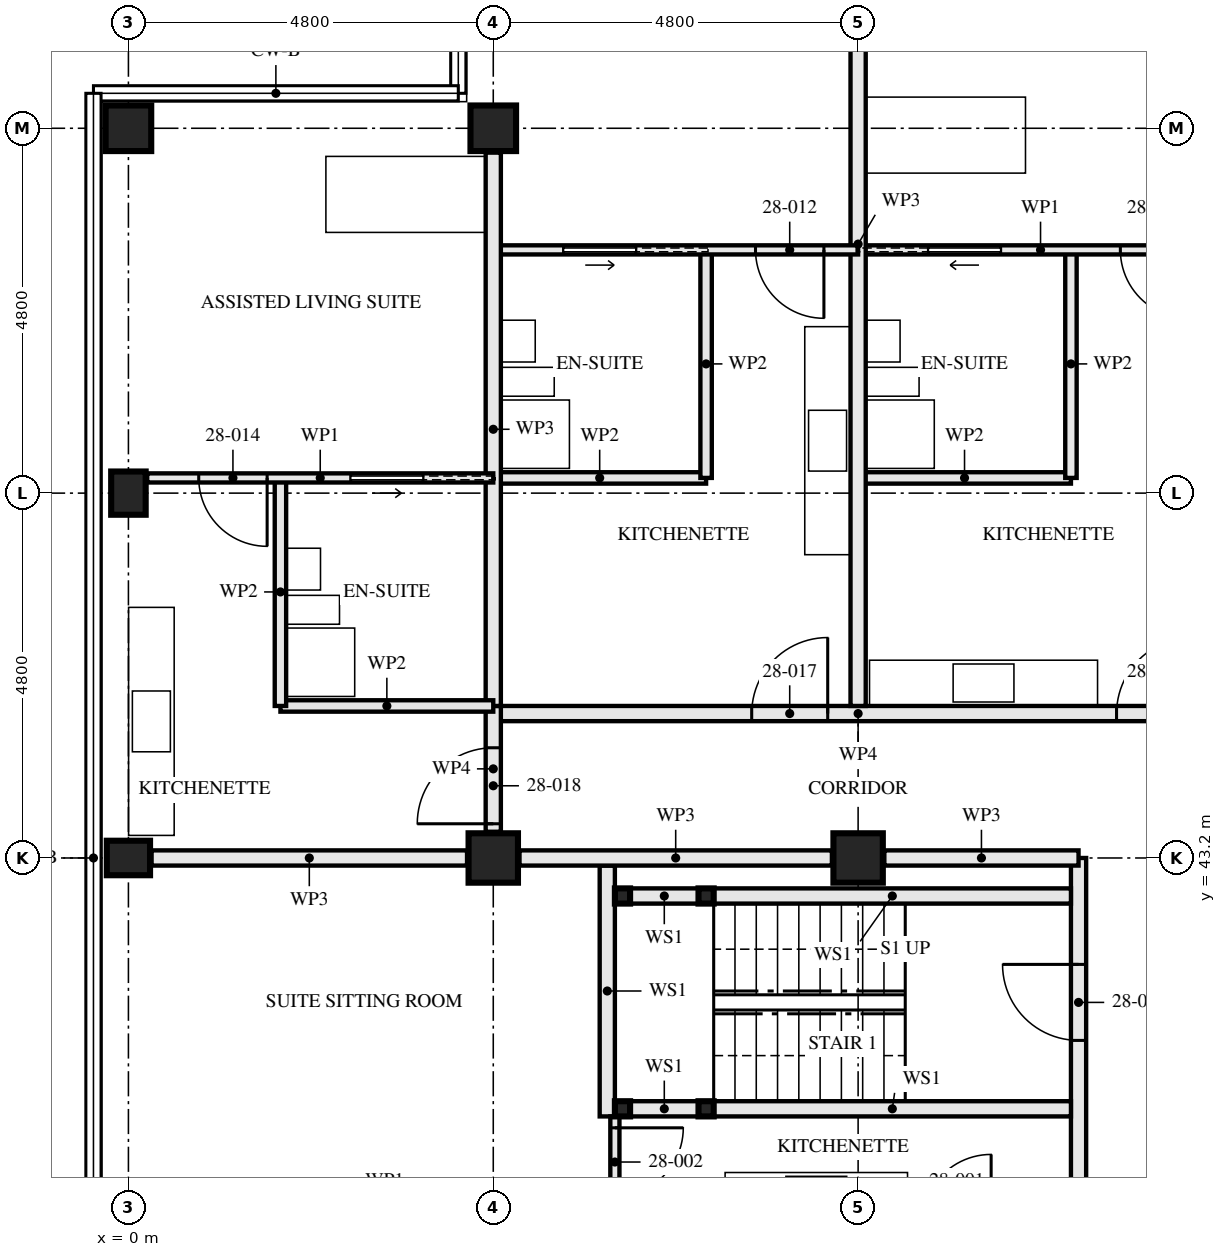
"""IFC4 building model, lengths in metres.
Left out: names, types, materials, properties, quantities, classifications, styles, units other than length and angle.
Written with IfcOpenShell. Run it as: python <this file> out.ifc"""

import sys

from ifc_helpers import new_model, si_unit, direction, frame, frame_2d, origin, origin_2d, place, context, subcontext, project, spatial, rectangle, hollow_rectangle, i_section, extrude, element, fill, save


model = new_model("IFC4")
c1 = context("Model", 3, precision=1e-05, world=origin(), true_north=direction((0.0, 1.0)))
c2 = subcontext(c1, "Body", "Model", "MODEL_VIEW")
j1 = project(units=[si_unit("LENGTHUNIT", "METRE"), si_unit("PLANEANGLEUNIT", "RADIAN")], contexts=[c1])
p1 = place(None, origin())
s1 = spatial("IfcSite", under=j1, at=p1, CompositionType="ELEMENT")
p2 = place(p1, origin())
s2 = spatial("IfcBuilding", under=s1, at=p2, CompositionType="ELEMENT")
p3 = place(p2, frame((0.0, 0.0, 105.0)))
s3 = spatial("IfcBuildingStorey", under=s2, at=p3, CompositionType="ELEMENT", Elevation=105.0)
for number, where, z_axis, x_axis in (
    (1, (0.0, 43.2, 0.0), (0.0, 0.0, 1.0), (0.0, 1.0, 0.0)),
    (2, (0.0, 48.0, 0.0), (0.0, 0.0, 1.0), (1.0, 0.0, 0.0)),
):
    element("IfcColumn", number, at=place(p3, frame(where, z_axis=z_axis, x_axis=x_axis)), inside=s3, PredefinedType="COLUMN", context=c2, shape_type="SweptSolid", body=[
        extrude(i_section(OverallWidth=0.454, OverallDepth=0.569, WebThickness=0.078, FlangeThickness=0.125, FilletRadius=0.015, at=origin_2d()), origin(), (0.0, 0.0, 1.0), 3.5),
    ])
p4 = place(p3, frame((0.0, 52.8, 0.0), z_axis=(0.0, 0.0, 1.0), x_axis=(0.0, 1.0, 0.0)))
e3 = element("IfcColumn", 3, at=p4, inside=s3, PredefinedType="COLUMN", context=c2, shape_type="SweptSolid", body=[
    extrude(hollow_rectangle(XDim=0.6, YDim=0.6, WallThickness=0.05, at=origin_2d()), origin(), (0.0, 0.0, 1.0), 3.5),
])
p5 = place(p3, frame((4.8, 43.2, 0.0), z_axis=(0.0, 0.0, 1.0), x_axis=(0.0, 1.0, 0.0)))
e4 = element("IfcColumn", 4, at=p5, inside=s3, PredefinedType="COLUMN", context=c2, shape_type="SweptSolid", body=[
    extrude(hollow_rectangle(XDim=0.65, YDim=0.65, WallThickness=0.05, at=origin_2d()), origin(), (0.0, 0.0, 1.0), 3.5),
])
p6 = place(p3, frame((4.8, 52.8, 0.0), z_axis=(0.0, 0.0, 1.0), x_axis=(0.0, 1.0, 0.0)))
e5 = element("IfcColumn", 5, at=p6, inside=s3, PredefinedType="COLUMN", context=c2, shape_type="SweptSolid", body=[
    extrude(hollow_rectangle(XDim=0.6, YDim=0.6, WallThickness=0.05, at=origin_2d()), origin(), (0.0, 0.0, 1.0), 3.5),
])
p7 = place(p3, frame((9.6, 43.2, 0.0), z_axis=(0.0, 0.0, 1.0), x_axis=(0.0, 1.0, 0.0)))
e6 = element("IfcColumn", 6, at=p7, inside=s3, PredefinedType="COLUMN", context=c2, shape_type="SweptSolid", body=[
    extrude(hollow_rectangle(XDim=0.65, YDim=0.65, WallThickness=0.05, at=origin_2d()), origin(), (0.0, 0.0, 1.0), 3.5),
])
for number, where, z_axis, x_axis in (
    (7, (6.5, 42.7, 0.0), (0.0, 0.0, 1.0), (1.0, 0.0, 0.0)),
    (8, (6.5, 39.9, 0.0), (0.0, 0.0, 1.0), (1.0, 0.0, 0.0)),
    (9, (7.6, 42.7, 0.0), (0.0, 0.0, 1.0), (1.0, 0.0, 0.0)),
    (10, (7.6, 39.9, 0.0), (0.0, 0.0, 1.0), (1.0, 0.0, 0.0)),
):
    element("IfcColumn", number, at=place(p3, frame(where, z_axis=z_axis, x_axis=x_axis)), inside=s3, PredefinedType="COLUMN", context=c2, shape_type="SweptSolid", body=[
        extrude(hollow_rectangle(XDim=0.2, YDim=0.2, WallThickness=0.008, at=origin_2d()), origin(), (0.0, 0.0, 1.0), 3.33),
    ])
p8 = place(p3, frame((6.6, 42.7, 0.0), z_axis=(0.0, 0.0, 1.0), x_axis=(1.0, 0.0, 0.0)))
e11 = element("IfcWall", 11, at=p8, inside=s3, PredefinedType="SOLIDWALL", context=c2, shape_type="SweptSolid", body=[
    extrude(rectangle(XDim=0.9, YDim=0.2, at=frame_2d((0.45, 0.0))), origin(), (0.0, 0.0, 1.0), 2.99),
])
p9 = place(p3, frame((7.7, 42.7, 0.0), z_axis=(0.0, 0.0, 1.0), x_axis=(1.0, 0.0, 0.0)))
e12 = element("IfcWall", 12, at=p9, inside=s3, PredefinedType="SOLIDWALL", context=c2, shape_type="SweptSolid", body=[
    extrude(rectangle(XDim=4.7, YDim=0.2, at=frame_2d((2.35, 0.0))), origin(), (0.0, 0.0, 1.0), 2.99),
])
p10 = place(p3, frame((6.6, 39.9, 0.0), z_axis=(0.0, 0.0, 1.0), x_axis=(1.0, 0.0, 0.0)))
e13 = element("IfcWall", 13, at=p10, inside=s3, PredefinedType="SOLIDWALL", context=c2, shape_type="SweptSolid", body=[
    extrude(rectangle(XDim=0.9, YDim=0.2, at=frame_2d((0.45, 0.0))), origin(), (0.0, 0.0, 1.0), 2.99),
])
p11 = place(p3, frame((7.7, 39.9, 0.0), z_axis=(0.0, 0.0, 1.0), x_axis=(1.0, 0.0, 0.0)))
e14 = element("IfcWall", 14, at=p11, inside=s3, PredefinedType="SOLIDWALL", context=c2, shape_type="SweptSolid", body=[
    extrude(rectangle(XDim=4.7, YDim=0.2, at=frame_2d((2.35, 0.0))), origin(), (0.0, 0.0, 1.0), 2.99),
])
p12 = place(p3, frame((6.3, 43.1, 0.0), z_axis=(0.0, 0.0, 1.0), x_axis=(0.0, -1.0, 0.0)))
e15 = element("IfcWall", 15, at=p12, inside=s3, PredefinedType="SOLIDWALL", context=c2, shape_type="SweptSolid", body=[
    extrude(rectangle(XDim=3.3, YDim=0.2, at=frame_2d((1.65, 0.0))), origin(), (0.0, 0.0, 1.0), 3.33),
])
p13 = place(p3, frame((6.4, 39.8, 0.0), z_axis=(0.0, 0.0, 1.0), x_axis=(0.0, -1.0, 0.0)))
e16 = element("IfcWall", 16, at=p13, inside=s3, PredefinedType="PARTITIONING", context=c2, shape_type="SweptSolid", body=[
    extrude(rectangle(XDim=1.4, YDim=0.12, at=frame_2d((0.7, 0.0))), origin(), (0.0, 0.0, 1.0), 3.33),
])
p14 = place(p13, frame((0.15, 0.0, 0.0)))
e17 = element("IfcOpeningElement", 17, at=p14, cuts=e16, PredefinedType="OPENING", context=c2, shape_type="SweptSolid", body=[
    extrude(rectangle(XDim=0.9, YDim=2.1, at=frame_2d((0.45, 1.05))), frame((0.0, 0.071, 0.0), z_axis=(0.0, -1.0, 0.0), x_axis=(1.0, 0.0, 0.0)), (0.0, 0.0, 1.0), 0.141),
])
p15 = place(p3, frame((12.5, 43.2, 0.0), z_axis=(0.0, 0.0, 1.0), x_axis=(0.0, -1.0, 0.0)))
e18 = element("IfcWall", 18, at=p15, inside=s3, PredefinedType="PARTITIONING", context=c2, shape_type="SweptSolid", body=[
    extrude(rectangle(XDim=14.84, YDim=0.2, at=frame_2d((7.42, 0.0))), origin(), (0.0, 0.0, 1.0), 2.32),
])
p16 = place(p15, frame((1.4, 0.0, 0.0)))
e19 = element("IfcOpeningElement", 19, at=p16, cuts=e18, PredefinedType="OPENING", context=c2, shape_type="SweptSolid", body=[
    extrude(rectangle(XDim=1.0, YDim=2.1, at=frame_2d((0.5, 1.05))), frame((0.0, 0.111, 0.0), z_axis=(0.0, -1.0, 0.0), x_axis=(1.0, 0.0, 0.0)), (0.0, 0.0, 1.0), 0.221),
])
p17 = place(p15, frame((5.2, 0.0, 0.0)))
e20 = element("IfcOpeningElement", 20, at=p17, cuts=e18, PredefinedType="OPENING", context=c2, shape_type="SweptSolid", body=[
    extrude(rectangle(XDim=1.0, YDim=2.1, at=frame_2d((0.5, 1.05))), frame((0.0, 0.111, 0.0), z_axis=(0.0, -1.0, 0.0), x_axis=(1.0, 0.0, 0.0)), (0.0, 0.0, 1.0), 0.221),
])
p18 = place(p15, frame((13.0, 0.0, 0.0)))
e21 = element("IfcOpeningElement", 21, at=p18, cuts=e18, PredefinedType="OPENING", context=c2, shape_type="SweptSolid", body=[
    extrude(rectangle(XDim=1.0, YDim=2.1, at=frame_2d((0.5, 1.05))), frame((0.0, 0.111, 0.0), z_axis=(0.0, -1.0, 0.0), x_axis=(1.0, 0.0, 0.0)), (0.0, 0.0, 1.0), 0.221),
])
p19 = place(p3, frame((12.4, 51.2, 0.0), z_axis=(0.0, 0.0, 1.0), x_axis=(0.0, -1.0, 0.0)))
e22 = element("IfcWall", 22, at=p19, inside=s3, PredefinedType="PARTITIONING", context=c2, shape_type="SweptSolid", body=[
    extrude(rectangle(XDim=3.0, YDim=0.15, at=frame_2d((1.5, 0.0))), origin(), (0.0, 0.0, 1.0), 3.33),
])
p20 = place(p3, frame((12.4, 48.2, 0.0), z_axis=(0.0, 0.0, 1.0), x_axis=(-1.0, 0.0, 0.0)))
e23 = element("IfcWall", 23, at=p20, inside=s3, PredefinedType="PARTITIONING", context=c2, shape_type="SweptSolid", body=[
    extrude(rectangle(XDim=2.8, YDim=0.15, at=frame_2d((1.4, 0.0))), origin(), (0.0, 0.0, 1.0), 3.33),
])
p21 = place(p3, frame((14.4, 51.2, 0.0), z_axis=(0.0, 0.0, 1.0), x_axis=(-1.0, 0.0, 0.0)))
e24 = element("IfcWall", 24, at=p21, inside=s3, PredefinedType="PARTITIONING", context=c2, shape_type="SweptSolid", body=[
    extrude(rectangle(XDim=4.8, YDim=0.12, at=frame_2d((2.4, 0.0))), origin(), (0.0, 0.0, 1.0), 3.33),
])
p22 = place(p21, frame((0.45, 0.0, 0.0)))
e25 = element("IfcOpeningElement", 25, at=p22, cuts=e24, PredefinedType="OPENING", context=c2, shape_type="SweptSolid", body=[
    extrude(rectangle(XDim=0.9, YDim=2.1, at=frame_2d((0.45, 1.05))), frame((0.0, 0.071, 0.0), z_axis=(0.0, -1.0, 0.0), x_axis=(1.0, 0.0, 0.0)), (0.0, 0.0, 1.0), 0.141),
])
p23 = place(p21, frame((2.925, 0.0, 0.0)))
e26 = element("IfcOpeningElement", 26, at=p23, cuts=e24, PredefinedType="OPENING", context=c2, shape_type="SweptSolid", body=[
    extrude(rectangle(XDim=0.95, YDim=2.1, at=frame_2d((0.475, 1.05))), frame((0.0, 0.071, 0.0), z_axis=(0.0, -1.0, 0.0), x_axis=(1.0, 0.0, 0.0)), (0.0, 0.0, 1.0), 0.141),
])
p24 = place(p3, frame((9.6, 57.353, 0.0), z_axis=(0.0, 0.0, 1.0), x_axis=(0.0, -1.0, 0.0)))
e27 = element("IfcWall", 27, at=p24, inside=s3, PredefinedType="PARTITIONING", context=c2, shape_type="SweptSolid", body=[
    extrude(rectangle(XDim=12.153, YDim=0.2, at=frame_2d((6.077, 0.0))), origin(), (0.0, 0.0, 1.0), 2.55),
])
p25 = place(p3, frame((7.6, 51.2, 0.0), z_axis=(0.0, 0.0, 1.0), x_axis=(0.0, -1.0, 0.0)))
e28 = element("IfcWall", 28, at=p25, inside=s3, PredefinedType="PARTITIONING", context=c2, shape_type="SweptSolid", body=[
    extrude(rectangle(XDim=3.0, YDim=0.15, at=frame_2d((1.5, 0.0))), origin(), (0.0, 0.0, 1.0), 3.33),
])
p26 = place(p3, frame((7.6, 48.2, 0.0), z_axis=(0.0, 0.0, 1.0), x_axis=(-1.0, 0.0, 0.0)))
e29 = element("IfcWall", 29, at=p26, inside=s3, PredefinedType="PARTITIONING", context=c2, shape_type="SweptSolid", body=[
    extrude(rectangle(XDim=2.8, YDim=0.15, at=frame_2d((1.4, 0.0))), origin(), (0.0, 0.0, 1.0), 3.33),
])
p27 = place(p3, frame((9.6, 51.2, 0.0), z_axis=(0.0, 0.0, 1.0), x_axis=(-1.0, 0.0, 0.0)))
e30 = element("IfcWall", 30, at=p27, inside=s3, PredefinedType="PARTITIONING", context=c2, shape_type="SweptSolid", body=[
    extrude(rectangle(XDim=4.8, YDim=0.12, at=frame_2d((2.4, 0.0))), origin(), (0.0, 0.0, 1.0), 3.33),
])
p28 = place(p27, frame((0.45, 0.0, 0.0)))
e31 = element("IfcOpeningElement", 31, at=p28, cuts=e30, PredefinedType="OPENING", context=c2, shape_type="SweptSolid", body=[
    extrude(rectangle(XDim=0.9, YDim=2.1, at=frame_2d((0.45, 1.05))), frame((0.0, 0.071, 0.0), z_axis=(0.0, -1.0, 0.0), x_axis=(1.0, 0.0, 0.0)), (0.0, 0.0, 1.0), 0.141),
])
p29 = place(p27, frame((2.925, 0.0, 0.0)))
e32 = element("IfcOpeningElement", 32, at=p29, cuts=e30, PredefinedType="OPENING", context=c2, shape_type="SweptSolid", body=[
    extrude(rectangle(XDim=0.95, YDim=2.1, at=frame_2d((0.475, 1.05))), frame((0.0, 0.071, 0.0), z_axis=(0.0, -1.0, 0.0), x_axis=(1.0, 0.0, 0.0)), (0.0, 0.0, 1.0), 0.141),
])
p30 = place(p3, frame((4.8, 52.48, 0.0), z_axis=(0.0, 0.0, 1.0), x_axis=(0.0, -1.0, 0.0)))
e33 = element("IfcWall", 33, at=p30, inside=s3, PredefinedType="PARTITIONING", context=c2, shape_type="SweptSolid", body=[
    extrude(rectangle(XDim=7.28, YDim=0.2, at=frame_2d((3.64, 0.0))), origin(), (0.0, 0.0, 1.0), 2.55),
])
p31 = place(p3, frame((2.0, 48.2, 0.0), z_axis=(0.0, 0.0, 1.0), x_axis=(0.0, -1.0, 0.0)))
e34 = element("IfcWall", 34, at=p31, inside=s3, PredefinedType="PARTITIONING", context=c2, shape_type="SweptSolid", body=[
    extrude(rectangle(XDim=3.0, YDim=0.15, at=frame_2d((1.5, 0.0))), origin(), (0.0, 0.0, 1.0), 2.55),
])
p32 = place(p3, frame((4.8, 45.2, 0.0), z_axis=(0.0, 0.0, 1.0), x_axis=(-1.0, 0.0, 0.0)))
e35 = element("IfcWall", 35, at=p32, inside=s3, PredefinedType="PARTITIONING", context=c2, shape_type="SweptSolid", body=[
    extrude(rectangle(XDim=2.8, YDim=0.15, at=frame_2d((1.4, 0.0))), origin(), (0.0, 0.0, 1.0), 3.33),
])
p33 = place(p3, frame((4.8, 48.2, 0.0), z_axis=(0.0, 0.0, 1.0), x_axis=(-1.0, 0.0, 0.0)))
e36 = element("IfcWall", 36, at=p33, inside=s3, PredefinedType="PARTITIONING", context=c2, shape_type="SweptSolid", body=[
    extrude(rectangle(XDim=4.553, YDim=0.12, at=frame_2d((2.276, 0.0))), origin(), (0.0, 0.0, 1.0), 3.33),
])
p34 = place(p33, frame((2.975, 0.0, 0.0)))
e37 = element("IfcOpeningElement", 37, at=p34, cuts=e36, PredefinedType="OPENING", context=c2, shape_type="SweptSolid", body=[
    extrude(rectangle(XDim=0.9, YDim=2.1, at=frame_2d((0.45, 1.05))), frame((0.0, 0.071, 0.0), z_axis=(0.0, -1.0, 0.0), x_axis=(1.0, 0.0, 0.0)), (0.0, 0.0, 1.0), 0.141),
])
p35 = place(p33, frame((0.925, 0.0, 0.0)))
e38 = element("IfcOpeningElement", 38, at=p35, cuts=e36, PredefinedType="OPENING", context=c2, shape_type="SweptSolid", body=[
    extrude(rectangle(XDim=0.95, YDim=2.1, at=frame_2d((0.475, 1.05))), frame((0.0, 0.071, 0.0), z_axis=(0.0, -1.0, 0.0), x_axis=(1.0, 0.0, 0.0)), (0.0, 0.0, 1.0), 0.141),
])
p36 = place(p3, frame((14.4, 45.1, 0.0), z_axis=(0.0, 0.0, 1.0), x_axis=(-1.0, 0.0, 0.0)))
e39 = element("IfcWall", 39, at=p36, inside=s3, PredefinedType="PARTITIONING", context=c2, shape_type="SweptSolid", body=[
    extrude(rectangle(XDim=9.6, YDim=0.2, at=frame_2d((4.8, 0.0))), origin(), (0.0, 0.0, 1.0), 3.33),
])
p37 = place(p36, frame((0.4, 0.0, 0.0)))
e40 = element("IfcOpeningElement", 40, at=p37, cuts=e39, PredefinedType="OPENING", context=c2, shape_type="SweptSolid", body=[
    extrude(rectangle(XDim=1.0, YDim=2.1, at=frame_2d((0.5, 1.05))), frame((0.0, 0.111, 0.0), z_axis=(0.0, -1.0, 0.0), x_axis=(1.0, 0.0, 0.0)), (0.0, 0.0, 1.0), 0.221),
])
p38 = place(p36, frame((5.2, 0.0, 0.0)))
e41 = element("IfcOpeningElement", 41, at=p38, cuts=e39, PredefinedType="OPENING", context=c2, shape_type="SweptSolid", body=[
    extrude(rectangle(XDim=1.0, YDim=2.1, at=frame_2d((0.5, 1.05))), frame((0.0, 0.111, 0.0), z_axis=(0.0, -1.0, 0.0), x_axis=(1.0, 0.0, 0.0)), (0.0, 0.0, 1.0), 0.221),
])
p39 = place(p3, frame((4.8, 45.2, 0.0), z_axis=(0.0, 0.0, 1.0), x_axis=(0.0, -1.0, 0.0)))
e42 = element("IfcWall", 42, at=p39, inside=s3, PredefinedType="PARTITIONING", context=c2, shape_type="SweptSolid", body=[
    extrude(rectangle(XDim=1.655, YDim=0.2, at=frame_2d((0.828, 0.0))), origin(), (0.0, 0.0, 1.0), 3.33),
])
p40 = place(p39, frame((0.55, 0.0, 0.0)))
e43 = element("IfcOpeningElement", 43, at=p40, cuts=e42, PredefinedType="OPENING", context=c2, shape_type="SweptSolid", body=[
    extrude(rectangle(XDim=1.0, YDim=2.1, at=frame_2d((0.5, 1.05))), frame((0.0, 0.111, 0.0), z_axis=(0.0, -1.0, 0.0), x_axis=(1.0, 0.0, 0.0)), (0.0, 0.0, 1.0), 0.221),
])
p41 = place(p3, frame((12.5, 43.2, 0.0), z_axis=(0.0, 0.0, 1.0), x_axis=(-1.0, 0.0, 0.0)))
e44 = element("IfcWall", 44, at=p41, inside=s3, PredefinedType="PARTITIONING", context=c2, shape_type="SweptSolid", body=[
    extrude(rectangle(XDim=2.555, YDim=0.2, at=frame_2d((1.277, 0.0))), origin(), (0.0, 0.0, 1.0), 2.32),
])
p42 = place(p3, frame((9.255, 43.2, 0.0), z_axis=(0.0, 0.0, 1.0), x_axis=(-1.0, 0.0, 0.0)))
e45 = element("IfcWall", 45, at=p42, inside=s3, PredefinedType="PARTITIONING", context=c2, shape_type="SweptSolid", body=[
    extrude(rectangle(XDim=4.11, YDim=0.2, at=frame_2d((2.055, 0.0))), origin(), (0.0, 0.0, 1.0), 2.32),
])
p43 = place(p3, frame((4.455, 43.2, 0.0), z_axis=(0.0, 0.0, 1.0), x_axis=(-1.0, 0.0, 0.0)))
e46 = element("IfcWall", 46, at=p43, inside=s3, PredefinedType="PARTITIONING", context=c2, shape_type="SweptSolid", body=[
    extrude(rectangle(XDim=4.151, YDim=0.2, at=frame_2d((2.075, 0.0))), origin(), (0.0, 0.0, 1.0), 2.32),
])
p44 = place(p14, origin())
e47 = element("IfcDoor", 47, at=p44, inside=s3, OperationType="SINGLE_SWING_RIGHT", PredefinedType="DOOR", context=c2, shape_type="SweptSolid", body=[
    extrude(rectangle(XDim=0.9, YDim=2.1, at=frame_2d((0.45, 1.05))), frame((0.0, 0.022, 0.0), z_axis=(0.0, -1.0, 0.0), x_axis=(1.0, 0.0, 0.0)), (0.0, 0.0, 1.0), 0.044),
])
fill(e17, e47)
p45 = place(p16, frame((1.0, 0.0, 0.0), z_axis=(0.0, 0.0, 1.0), x_axis=(-1.0, 0.0, 0.0)))
e48 = element("IfcDoor", 48, at=p45, inside=s3, OperationType="SINGLE_SWING_LEFT", PredefinedType="DOOR", context=c2, shape_type="SweptSolid", body=[
    extrude(rectangle(XDim=1.0, YDim=2.1, at=frame_2d((0.5, 1.05))), frame((0.0, 0.032, 0.0), z_axis=(0.0, -1.0, 0.0), x_axis=(1.0, 0.0, 0.0)), (0.0, 0.0, 1.0), 0.064),
])
fill(e19, e48)
p46 = place(p22, origin())
e49 = element("IfcDoor", 49, at=p46, inside=s3, OperationType="SINGLE_SWING_RIGHT", PredefinedType="DOOR", context=c2, shape_type="SweptSolid", body=[
    extrude(rectangle(XDim=0.9, YDim=2.1, at=frame_2d((0.45, 1.05))), frame((0.0, 0.022, 0.0), z_axis=(0.0, -1.0, 0.0), x_axis=(1.0, 0.0, 0.0)), (0.0, 0.0, 1.0), 0.044),
])
fill(e25, e49)
p47 = place(p23, origin())
e50 = element("IfcDoor", 50, at=p47, inside=s3, OperationType="SLIDING_TO_LEFT", PredefinedType="DOOR", context=c2, shape_type="SweptSolid", body=[
    extrude(rectangle(XDim=0.95, YDim=2.1, at=frame_2d((0.475, 1.05))), frame((0.0, 0.022, 0.0), z_axis=(0.0, -1.0, 0.0), x_axis=(1.0, 0.0, 0.0)), (0.0, 0.0, 1.0), 0.044),
])
fill(e26, e50)
p48 = place(p28, origin())
e51 = element("IfcDoor", 51, at=p48, inside=s3, OperationType="SINGLE_SWING_RIGHT", PredefinedType="DOOR", context=c2, shape_type="SweptSolid", body=[
    extrude(rectangle(XDim=0.9, YDim=2.1, at=frame_2d((0.45, 1.05))), frame((0.0, 0.022, 0.0), z_axis=(0.0, -1.0, 0.0), x_axis=(1.0, 0.0, 0.0)), (0.0, 0.0, 1.0), 0.044),
])
fill(e31, e51)
p49 = place(p29, origin())
e52 = element("IfcDoor", 52, at=p49, inside=s3, OperationType="SLIDING_TO_RIGHT", PredefinedType="DOOR", context=c2, shape_type="SweptSolid", body=[
    extrude(rectangle(XDim=0.95, YDim=2.1, at=frame_2d((0.475, 1.05))), frame((0.0, 0.022, 0.0), z_axis=(0.0, -1.0, 0.0), x_axis=(1.0, 0.0, 0.0)), (0.0, 0.0, 1.0), 0.044),
])
fill(e32, e52)
p50 = place(p34, origin())
e53 = element("IfcDoor", 53, at=p50, inside=s3, OperationType="SINGLE_SWING_RIGHT", PredefinedType="DOOR", context=c2, shape_type="SweptSolid", body=[
    extrude(rectangle(XDim=0.9, YDim=2.1, at=frame_2d((0.45, 1.05))), frame((0.0, 0.022, 0.0), z_axis=(0.0, -1.0, 0.0), x_axis=(1.0, 0.0, 0.0)), (0.0, 0.0, 1.0), 0.044),
])
fill(e37, e53)
p51 = place(p35, origin())
e54 = element("IfcDoor", 54, at=p51, inside=s3, OperationType="SLIDING_TO_RIGHT", PredefinedType="DOOR", context=c2, shape_type="SweptSolid", body=[
    extrude(rectangle(XDim=0.95, YDim=2.1, at=frame_2d((0.475, 1.05))), frame((0.0, 0.022, 0.0), z_axis=(0.0, -1.0, 0.0), x_axis=(1.0, 0.0, 0.0)), (0.0, 0.0, 1.0), 0.044),
])
fill(e38, e54)
p52 = place(p37, frame((1.0, 0.0, 0.0), z_axis=(0.0, 0.0, 1.0), x_axis=(-1.0, 0.0, 0.0)))
e55 = element("IfcDoor", 55, at=p52, inside=s3, OperationType="SINGLE_SWING_LEFT", PredefinedType="DOOR", context=c2, shape_type="SweptSolid", body=[
    extrude(rectangle(XDim=1.0, YDim=2.1, at=frame_2d((0.5, 1.05))), frame((0.0, 0.027, 0.0), z_axis=(0.0, -1.0, 0.0), x_axis=(1.0, 0.0, 0.0)), (0.0, 0.0, 1.0), 0.054),
])
fill(e40, e55)
p53 = place(p38, frame((1.0, 0.0, 0.0), z_axis=(0.0, 0.0, 1.0), x_axis=(-1.0, 0.0, 0.0)))
e56 = element("IfcDoor", 56, at=p53, inside=s3, OperationType="SINGLE_SWING_LEFT", PredefinedType="DOOR", context=c2, shape_type="SweptSolid", body=[
    extrude(rectangle(XDim=1.0, YDim=2.1, at=frame_2d((0.5, 1.05))), frame((0.0, 0.027, 0.0), z_axis=(0.0, -1.0, 0.0), x_axis=(1.0, 0.0, 0.0)), (0.0, 0.0, 1.0), 0.054),
])
fill(e41, e56)
p54 = place(p40, frame((1.0, 0.0, 0.0), z_axis=(0.0, 0.0, 1.0), x_axis=(-1.0, 0.0, 0.0)))
e57 = element("IfcDoor", 57, at=p54, inside=s3, OperationType="SINGLE_SWING_RIGHT", PredefinedType="DOOR", context=c2, shape_type="SweptSolid", body=[
    extrude(rectangle(XDim=1.0, YDim=2.1, at=frame_2d((0.5, 1.05))), frame((0.0, 0.027, 0.0), z_axis=(0.0, -1.0, 0.0), x_axis=(1.0, 0.0, 0.0)), (0.0, 0.0, 1.0), 0.054),
])
fill(e43, e57)
save(model, sys.argv[1])
